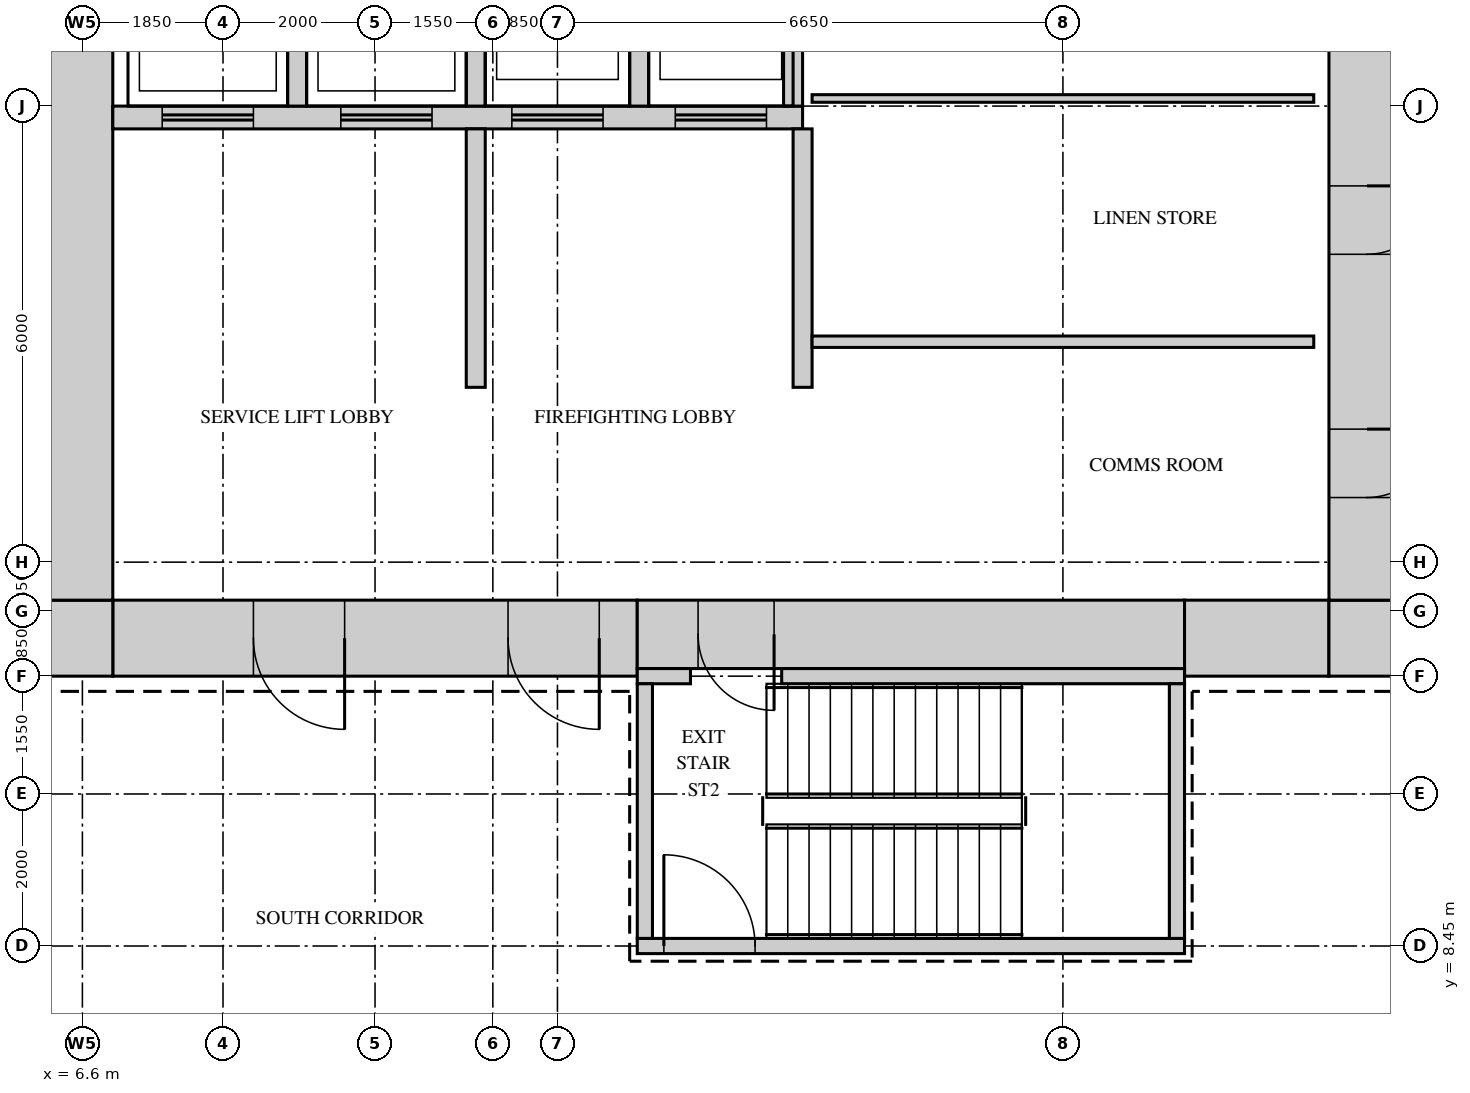
"""IFC4 building model, lengths in metres.
Left out: names, types, materials, properties, quantities, classifications, styles, units other than length and angle.
Written with IfcOpenShell. Run it as: python <this file> out.ifc"""

import sys

from ifc_helpers import new_model, si_unit, direction, frame, frame_2d, origin, place, context, subcontext, project, spatial, rectangle, extrude, source, transform, mapped, element, fill, save


model = new_model("IFC4")
c1 = context("Model", 3, precision=1e-05, world=origin(), true_north=direction((0.0, 1.0)))
c2 = subcontext(c1, "Body", "Model", "MODEL_VIEW")
j1 = project(units=[si_unit("LENGTHUNIT", "METRE"), si_unit("PLANEANGLEUNIT", "RADIAN")], contexts=[c1])
p1 = place(None, origin())
s1 = spatial("IfcSite", under=j1, at=p1, CompositionType="ELEMENT")
p2 = place(p1, origin())
s2 = spatial("IfcBuilding", under=s1, at=p2, CompositionType="ELEMENT")
p3 = place(p2, frame((0.0, 0.0, 132.3)))
s3 = spatial("IfcBuildingStorey", under=s2, at=p3, CompositionType="ELEMENT", Elevation=132.3)
m1 = source(origin(), c2, "Body", "SweptSolid", [
    extrude(rectangle(XDim=6.9, YDim=1.0, at=frame_2d((3.45, 0.0))), origin(), (0.0, 0.0, 1.0), 4.1),
])
p4 = place(p3, frame((7.0, 12.5, 0.0), z_axis=(0.0, 0.0, 1.0), x_axis=(1.0, 0.0, 0.0)))
e1 = element("IfcWall", 1, at=p4, inside=s3, PredefinedType="SHEAR", context=c2, shape_type="MappedRepresentation", body=[
    mapped(m1, transform((0.0, 0.0, 0.0))),
])
m2 = source(origin(), c2, "Body", "SweptSolid", [
    extrude(rectangle(XDim=1.2, YDim=2.1, at=frame_2d((0.6, 1.05))), frame((0.0, 0.51, 0.0), z_axis=(0.0, -1.0, 0.0), x_axis=(1.0, 0.0, 0.0)), (0.0, 0.0, 1.0), 1.02),
])
p5 = place(p4, frame((5.2, 0.0, 0.0)))
e2 = element("IfcOpeningElement", 2, at=p5, cuts=e1, PredefinedType="OPENING", context=c2, shape_type="MappedRepresentation", body=[
    mapped(m2, transform((0.0, 0.0, 0.0))),
])
p6 = place(p4, frame((1.85, 0.0, 0.0)))
e3 = element("IfcOpeningElement", 3, at=p6, cuts=e1, PredefinedType="OPENING", context=c2, shape_type="MappedRepresentation", body=[
    mapped(m2, transform((0.0, 0.0, 0.0))),
])
m3 = source(origin(), c2, "Body", "SweptSolid", [
    extrude(rectangle(XDim=7.2, YDim=0.9, at=frame_2d((3.6, 0.0))), origin(), (0.0, 0.0, 1.0), 4.1),
])
p7 = place(p3, frame((13.9, 12.55, 0.0), z_axis=(0.0, 0.0, 1.0), x_axis=(1.0, 0.0, 0.0)))
e4 = element("IfcWall", 4, at=p7, inside=s3, PredefinedType="SHEAR", context=c2, shape_type="MappedRepresentation", body=[
    mapped(m3, transform((0.0, 0.0, 0.0))),
])
m4 = source(origin(), c2, "Body", "SweptSolid", [
    extrude(rectangle(XDim=1.0, YDim=2.1, at=frame_2d((0.5, 1.05))), frame((0.0, 0.46, 0.0), z_axis=(0.0, -1.0, 0.0), x_axis=(1.0, 0.0, 0.0)), (0.0, 0.0, 1.0), 0.92),
])
p8 = place(p7, frame((0.8, 0.0, 0.0)))
e5 = element("IfcOpeningElement", 5, at=p8, cuts=e4, PredefinedType="OPENING", context=c2, shape_type="MappedRepresentation", body=[
    mapped(m4, transform((0.0, 0.0, 0.0))),
])
m5 = source(origin(), c2, "Body", "SweptSolid", [
    extrude(rectangle(XDim=1.9, YDim=1.0, at=frame_2d((0.95, 0.0))), origin(), (0.0, 0.0, 1.0), 4.1),
])
p9 = place(p3, frame((21.1, 12.5, 0.0), z_axis=(0.0, 0.0, 1.0), x_axis=(1.0, 0.0, 0.0)))
e6 = element("IfcWall", 6, at=p9, inside=s3, PredefinedType="SHEAR", context=c2, shape_type="MappedRepresentation", body=[
    mapped(m5, transform((0.0, 0.0, 0.0))),
])
m6 = source(origin(), c2, "Body", "SweptSolid", [
    extrude(rectangle(XDim=1.0, YDim=1.0, at=frame_2d((0.5, 0.0))), origin(), (0.0, 0.0, 1.0), 4.1),
])
for number, where, z_axis, x_axis in (
    (7, (23.0, 12.5, 0.0), (0.0, 0.0, 1.0), (1.0, 0.0, 0.0)),
    (8, (6.0, 12.5, 0.0), (0.0, 0.0, 1.0), (1.0, 0.0, 0.0)),
):
    element("IfcWall", number, at=place(p3, frame(where, z_axis=z_axis, x_axis=x_axis)), inside=s3, PredefinedType="SHEAR", context=c2, shape_type="MappedRepresentation", body=[
        mapped(m6, transform((0.0, 0.0, 0.0))),
    ])
m7 = source(origin(), c2, "Body", "SweptSolid", [
    extrude(rectangle(XDim=28.0, YDim=1.0, at=frame_2d((14.0, 0.0))), origin(), (0.0, 0.0, 1.0), 4.1),
])
p10 = place(p3, frame((23.5, 13.0, 0.0), z_axis=(0.0, 0.0, 1.0), x_axis=(0.0, 1.0, 0.0)))
e9 = element("IfcWall", 9, at=p10, inside=s3, PredefinedType="SHEAR", context=c2, shape_type="MappedRepresentation", body=[
    mapped(m7, transform((0.0, 0.0, 0.0))),
])
m8 = source(origin(), c2, "Body", "SweptSolid", [
    extrude(rectangle(XDim=1.8, YDim=2.1, at=frame_2d((0.9, 1.05))), frame((0.0, 0.51, 0.0), z_axis=(0.0, -1.0, 0.0), x_axis=(1.0, 0.0, 0.0)), (0.0, 0.0, 1.0), 1.02),
])
p11 = place(p10, frame((22.6, 0.0, 0.0)))
e10 = element("IfcOpeningElement", 10, at=p11, cuts=e9, PredefinedType="OPENING", context=c2, shape_type="MappedRepresentation", body=[
    mapped(m8, transform((0.0, 0.0, 0.0))),
])
p12 = place(p10, frame((15.35, 0.0, 0.0)))
e11 = element("IfcOpeningElement", 11, at=p12, cuts=e9, PredefinedType="OPENING", context=c2, shape_type="MappedRepresentation", body=[
    mapped(m2, transform((0.0, 0.0, 0.0))),
])
m9 = source(origin(), c2, "Body", "SweptSolid", [
    extrude(rectangle(XDim=0.9, YDim=2.1, at=frame_2d((0.45, 1.05))), frame((0.0, 0.51, 0.0), z_axis=(0.0, -1.0, 0.0), x_axis=(1.0, 0.0, 0.0)), (0.0, 0.0, 1.0), 1.02),
])
p13 = place(p10, frame((1.35, 0.0, 0.0)))
e12 = element("IfcOpeningElement", 12, at=p13, cuts=e9, PredefinedType="OPENING", context=c2, shape_type="MappedRepresentation", body=[
    mapped(m9, transform((0.0, 0.0, 0.0))),
])
p14 = place(p10, frame((4.55, 0.0, 0.0)))
e13 = element("IfcOpeningElement", 13, at=p14, cuts=e9, PredefinedType="OPENING", context=c2, shape_type="MappedRepresentation", body=[
    mapped(m9, transform((0.0, 0.0, 0.0))),
])
p15 = place(p10, frame((7.8, 0.0, 0.0)))
e14 = element("IfcOpeningElement", 14, at=p15, cuts=e9, PredefinedType="OPENING", context=c2, shape_type="MappedRepresentation", body=[
    mapped(m9, transform((0.0, 0.0, 0.0))),
])
p16 = place(p3, frame((6.5, 13.0, 0.0), z_axis=(0.0, 0.0, 1.0), x_axis=(0.0, 1.0, 0.0)))
e15 = element("IfcWall", 15, at=p16, inside=s3, PredefinedType="SHEAR", context=c2, shape_type="MappedRepresentation", body=[
    mapped(m7, transform((0.0, 0.0, 0.0))),
])
m10 = source(origin(), c2, "Body", "SweptSolid", [
    extrude(rectangle(XDim=0.7, YDim=0.2, at=frame_2d((0.35, 0.0))), origin(), (0.0, 0.0, 1.0), 4.1),
])
p17 = place(p3, frame((13.9, 12.0, 0.0), z_axis=(0.0, 0.0, 1.0), x_axis=(1.0, 0.0, 0.0)))
e16 = element("IfcWall", 16, at=p17, inside=s3, PredefinedType="SHEAR", context=c2, shape_type="MappedRepresentation", body=[
    mapped(m10, transform((0.0, 0.0, 0.0))),
])
m11 = source(origin(), c2, "Body", "SweptSolid", [
    extrude(rectangle(XDim=5.3, YDim=0.2, at=frame_2d((2.65, 0.0))), origin(), (0.0, 0.0, 1.0), 4.1),
])
p18 = place(p3, frame((15.8, 12.0, 0.0), z_axis=(0.0, 0.0, 1.0), x_axis=(1.0, 0.0, 0.0)))
e17 = element("IfcWall", 17, at=p18, inside=s3, PredefinedType="SHEAR", context=c2, shape_type="MappedRepresentation", body=[
    mapped(m11, transform((0.0, 0.0, 0.0))),
])
m12 = source(origin(), c2, "Body", "SweptSolid", [
    extrude(rectangle(XDim=7.2, YDim=0.2, at=frame_2d((3.6, 0.0))), origin(), (0.0, 0.0, 1.0), 4.1),
])
p19 = place(p3, frame((13.9, 8.45, 0.0), z_axis=(0.0, 0.0, 1.0), x_axis=(1.0, 0.0, 0.0)))
e18 = element("IfcWall", 18, at=p19, inside=s3, PredefinedType="SHEAR", context=c2, shape_type="MappedRepresentation", body=[
    mapped(m12, transform((0.0, 0.0, 0.0))),
])
m13 = source(origin(), c2, "Body", "SweptSolid", [
    extrude(rectangle(XDim=1.2, YDim=2.1, at=frame_2d((0.6, 1.05))), frame((0.0, 0.11, 0.0), z_axis=(0.0, -1.0, 0.0), x_axis=(1.0, 0.0, 0.0)), (0.0, 0.0, 1.0), 0.22),
])
p20 = place(p19, frame((0.35, 0.0, 0.0)))
e19 = element("IfcOpeningElement", 19, at=p20, cuts=e18, PredefinedType="OPENING", context=c2, shape_type="MappedRepresentation", body=[
    mapped(m13, transform((0.0, 0.0, 0.0))),
])
m14 = source(origin(), c2, "Body", "SweptSolid", [
    extrude(rectangle(XDim=3.35, YDim=0.2, at=frame_2d((1.675, 0.0))), origin(), (0.0, 0.0, 1.0), 4.1),
])
for number, where, z_axis, x_axis in (
    (20, (21.0, 8.55, 0.0), (0.0, 0.0, 1.0), (0.0, 1.0, 0.0)),
    (21, (14.0, 8.55, 0.0), (0.0, 0.0, 1.0), (0.0, 1.0, 0.0)),
):
    element("IfcWall", number, at=place(p3, frame(where, z_axis=z_axis, x_axis=x_axis)), inside=s3, PredefinedType="SHEAR", context=c2, shape_type="MappedRepresentation", body=[
        mapped(m14, transform((0.0, 0.0, 0.0))),
    ])
m15 = source(origin(), c2, "Body", "SweptSolid", [
    extrude(rectangle(XDim=9.075, YDim=0.3, at=frame_2d((4.538, 0.0))), origin(), (0.0, 0.0, 1.0), 4.1),
])
p21 = place(p3, frame((7.0, 19.35, 0.0), z_axis=(0.0, 0.0, 1.0), x_axis=(1.0, 0.0, 0.0)))
e22 = element("IfcWall", 22, at=p21, inside=s3, PredefinedType="STANDARD", context=c2, shape_type="MappedRepresentation", body=[
    mapped(m15, transform((0.0, 0.0, 0.0))),
])
m16 = source(origin(), c2, "Body", "SweptSolid", [
    extrude(rectangle(XDim=1.2, YDim=2.1, at=frame_2d((0.6, 1.05))), frame((0.0, 0.16, 0.0), z_axis=(0.0, -1.0, 0.0), x_axis=(1.0, 0.0, 0.0)), (0.0, 0.0, 1.0), 0.32),
])
p22 = place(p21, frame((0.65, 0.0, 0.0)))
e23 = element("IfcOpeningElement", 23, at=p22, cuts=e22, PredefinedType="OPENING", context=c2, shape_type="MappedRepresentation", body=[
    mapped(m16, transform((0.0, 0.0, 0.0))),
])
p23 = place(p21, frame((3.0, 0.0, 0.0)))
e24 = element("IfcOpeningElement", 24, at=p23, cuts=e22, PredefinedType="OPENING", context=c2, shape_type="MappedRepresentation", body=[
    mapped(m16, transform((0.0, 0.0, 0.0))),
])
p24 = place(p21, frame((5.25, 0.0, 0.0)))
e25 = element("IfcOpeningElement", 25, at=p24, cuts=e22, PredefinedType="OPENING", context=c2, shape_type="MappedRepresentation", body=[
    mapped(m16, transform((0.0, 0.0, 0.0))),
])
p25 = place(p21, frame((7.4, 0.0, 0.0)))
e26 = element("IfcOpeningElement", 26, at=p25, cuts=e22, PredefinedType="OPENING", context=c2, shape_type="MappedRepresentation", body=[
    mapped(m16, transform((0.0, 0.0, 0.0))),
])
m17 = source(origin(), c2, "Body", "SweptSolid", [
    extrude(rectangle(XDim=3.1, YDim=0.25, at=frame_2d((1.55, 0.0))), origin(), (0.0, 0.0, 1.0), 4.1),
])
for number, where, z_axis, x_axis in (
    (27, (9.425, 19.5, 0.0), (0.0, 0.0, 1.0), (0.0, 1.0, 0.0)),
    (28, (11.775, 19.5, 0.0), (0.0, 0.0, 1.0), (0.0, 1.0, 0.0)),
    (29, (13.925, 19.5, 0.0), (0.0, 0.0, 1.0), (0.0, 1.0, 0.0)),
    (30, (15.95, 19.5, 0.0), (0.0, 0.0, 1.0), (0.0, 1.0, 0.0)),
):
    element("IfcWall", number, at=place(p3, frame(where, z_axis=z_axis, x_axis=x_axis)), inside=s3, PredefinedType="STANDARD", context=c2, shape_type="MappedRepresentation", body=[
        mapped(m17, transform((0.0, 0.0, 0.0))),
    ])
m18 = source(origin(), c2, "Body", "SweptSolid", [
    extrude(rectangle(XDim=3.4, YDim=0.25, at=frame_2d((1.7, 0.0))), origin(), (0.0, 0.0, 1.0), 4.1),
])
for number, where, z_axis, x_axis in (
    (31, (16.075, 15.8, 0.0), (0.0, 0.0, 1.0), (0.0, 1.0, 0.0)),
    (32, (11.775, 15.8, 0.0), (0.0, 0.0, 1.0), (0.0, 1.0, 0.0)),
):
    element("IfcWall", number, at=place(p3, frame(where, z_axis=z_axis, x_axis=x_axis)), inside=s3, PredefinedType="STANDARD", context=c2, shape_type="MappedRepresentation", body=[
        mapped(m18, transform((0.0, 0.0, 0.0))),
    ])
m19 = source(origin(), c2, "Body", "SweptSolid", [
    extrude(rectangle(XDim=6.6, YDim=0.15, at=frame_2d((3.3, 0.0))), origin(), (0.0, 0.0, 1.0), 4.2),
])
p26 = place(p3, frame((16.2, 16.4, 0.0), z_axis=(0.0, 0.0, 1.0), x_axis=(1.0, 0.0, 0.0)))
e33 = element("IfcWall", 33, at=p26, inside=s3, PredefinedType="PARTITIONING", context=c2, shape_type="MappedRepresentation", body=[
    mapped(m19, transform((0.0, 0.0, 0.0))),
])
m20 = source(origin(), c2, "Body", "SweptSolid", [
    extrude(rectangle(XDim=6.6, YDim=0.1, at=frame_2d((3.3, 0.0))), origin(), (0.0, 0.0, 1.0), 4.2),
])
p27 = place(p3, frame((16.2, 19.6, 0.0), z_axis=(0.0, 0.0, 1.0), x_axis=(1.0, 0.0, 0.0)))
e34 = element("IfcWall", 34, at=p27, inside=s3, PredefinedType="PARTITIONING", context=c2, shape_type="MappedRepresentation", body=[
    mapped(m20, transform((0.0, 0.0, 0.0))),
])
m21 = source(origin(), c2, "Body", "SweptSolid", [
    extrude(rectangle(XDim=0.9, YDim=2.1, at=frame_2d((0.45, 1.05))), frame((0.0, 0.45, 0.0), z_axis=(0.0, -1.0, 0.0), x_axis=(1.0, 0.0, 0.0)), (0.0, 0.0, 1.0), 0.9),
])
p28 = place(p13, origin())
e35 = element("IfcDoor", 35, at=p28, inside=s3, OperationType="SINGLE_SWING_RIGHT", PredefinedType="DOOR", context=c2, shape_type="MappedRepresentation", body=[
    mapped(m21, transform((0.0, 0.0, 0.0))),
])
fill(e12, e35)
p29 = place(p14, origin())
e36 = element("IfcDoor", 36, at=p29, inside=s3, OperationType="SINGLE_SWING_RIGHT", PredefinedType="DOOR", context=c2, shape_type="MappedRepresentation", body=[
    mapped(m21, transform((0.0, 0.0, 0.0))),
])
fill(e13, e36)
m22 = source(origin(), c2, "Body", "SweptSolid", [
    extrude(rectangle(XDim=1.2, YDim=2.1, at=frame_2d((0.6, 1.05))), frame((0.0, 0.45, 0.0), z_axis=(0.0, -1.0, 0.0), x_axis=(1.0, 0.0, 0.0)), (0.0, 0.0, 1.0), 0.9),
])
p30 = place(p5, origin())
e37 = element("IfcDoor", 37, at=p30, inside=s3, OperationType="SINGLE_SWING_RIGHT", PredefinedType="DOOR", context=c2, shape_type="MappedRepresentation", body=[
    mapped(m22, transform((0.0, 0.0, 0.0))),
])
fill(e2, e37)
p31 = place(p6, origin())
e38 = element("IfcDoor", 38, at=p31, inside=s3, OperationType="SINGLE_SWING_RIGHT", PredefinedType="DOOR", context=c2, shape_type="MappedRepresentation", body=[
    mapped(m22, transform((0.0, 0.0, 0.0))),
])
fill(e3, e38)
m23 = source(origin(), c2, "Body", "SweptSolid", [
    extrude(rectangle(XDim=1.0, YDim=2.1, at=frame_2d((0.5, 1.05))), frame((0.0, 0.4, 0.0), z_axis=(0.0, -1.0, 0.0), x_axis=(1.0, 0.0, 0.0)), (0.0, 0.0, 1.0), 0.8),
])
p32 = place(p8, origin())
e39 = element("IfcDoor", 39, at=p32, inside=s3, OperationType="SINGLE_SWING_RIGHT", PredefinedType="DOOR", context=c2, shape_type="MappedRepresentation", body=[
    mapped(m23, transform((0.0, 0.0, 0.0))),
])
fill(e5, e39)
m24 = source(origin(), c2, "Body", "SweptSolid", [
    extrude(rectangle(XDim=1.2, YDim=2.1, at=frame_2d((0.6, 1.05))), frame((0.0, 0.025, 0.0), z_axis=(0.0, -1.0, 0.0), x_axis=(1.0, 0.0, 0.0)), (0.0, 0.0, 1.0), 0.05),
])
p33 = place(p20, origin())
e40 = element("IfcDoor", 40, at=p33, inside=s3, OperationType="SINGLE_SWING_RIGHT", PredefinedType="DOOR", context=c2, shape_type="MappedRepresentation", body=[
    mapped(m24, transform((0.0, 0.0, 0.0))),
])
fill(e19, e40)
p34 = place(p22, origin())
e41 = element("IfcDoor", 41, at=p34, inside=s3, OperationType="DOUBLE_DOOR_SLIDING", PredefinedType="DOOR", context=c2, shape_type="MappedRepresentation", body=[
    mapped(m24, transform((0.0, 0.0, 0.0))),
])
fill(e23, e41)
p35 = place(p23, origin())
e42 = element("IfcDoor", 42, at=p35, inside=s3, OperationType="DOUBLE_DOOR_SLIDING", PredefinedType="DOOR", context=c2, shape_type="MappedRepresentation", body=[
    mapped(m24, transform((0.0, 0.0, 0.0))),
])
fill(e24, e42)
p36 = place(p24, origin())
e43 = element("IfcDoor", 43, at=p36, inside=s3, OperationType="DOUBLE_DOOR_SLIDING", PredefinedType="DOOR", context=c2, shape_type="MappedRepresentation", body=[
    mapped(m24, transform((0.0, 0.0, 0.0))),
])
fill(e25, e43)
p37 = place(p25, origin())
e44 = element("IfcDoor", 44, at=p37, inside=s3, OperationType="DOUBLE_DOOR_SLIDING", PredefinedType="DOOR", context=c2, shape_type="MappedRepresentation", body=[
    mapped(m24, transform((0.0, 0.0, 0.0))),
])
fill(e26, e44)
save(model, sys.argv[1])
